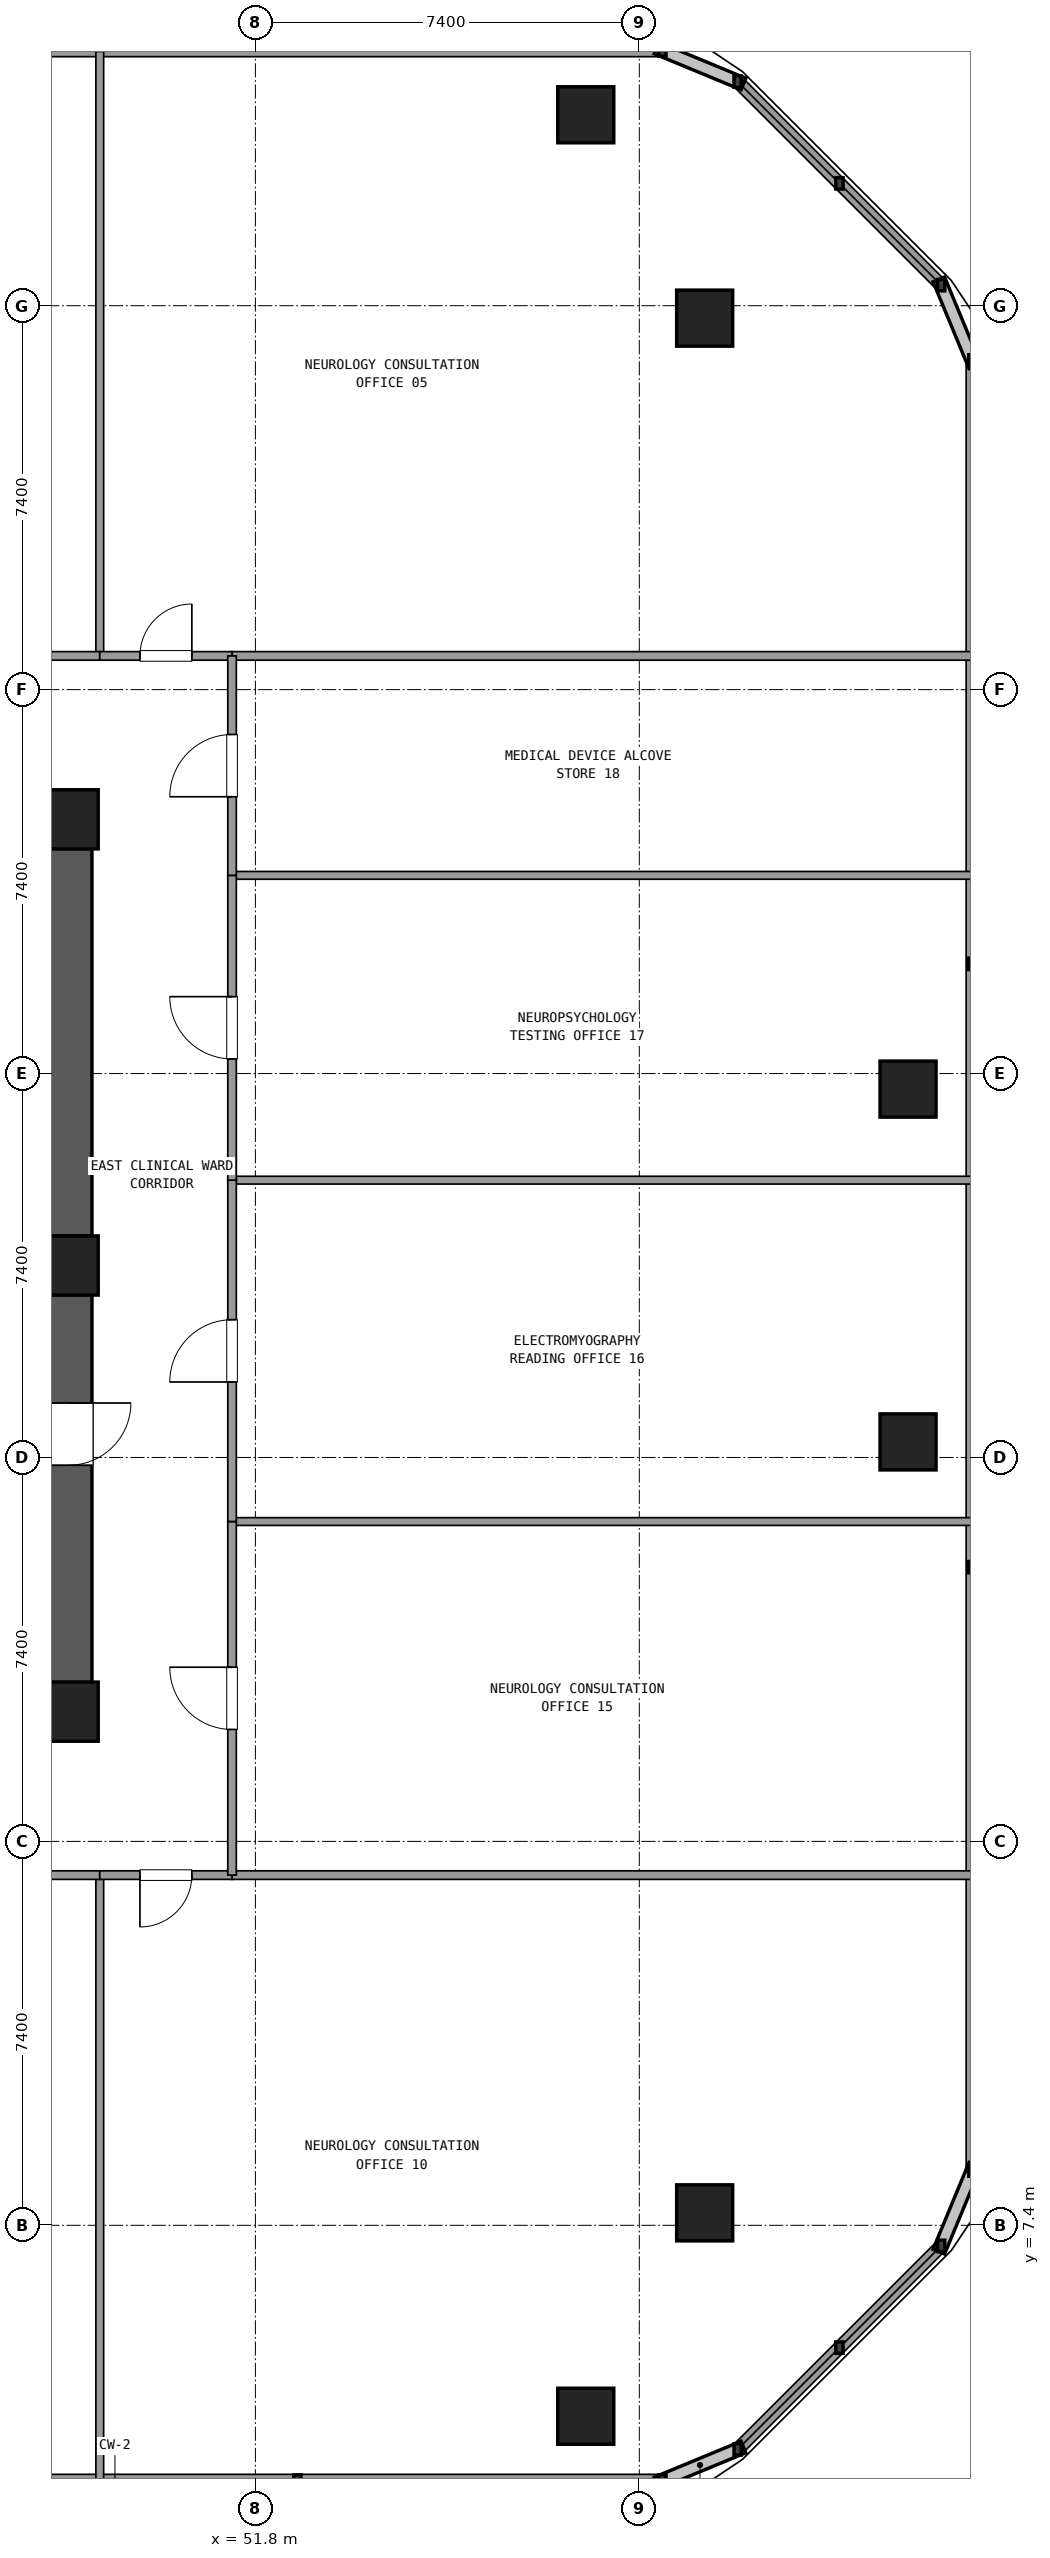
"""IFC4 building model, lengths in metres.
Left out: names, types, materials, properties, quantities, classifications, styles, units other than length and angle.
Written with IfcOpenShell. Run it as: python <this file> out.ifc"""

import sys

from ifc_helpers import new_model, si_unit, direction, frame, frame_2d, origin, origin_2d, place, context, subcontext, project, spatial, rectangle, extrude, element, fill, save


model = new_model("IFC4")
c1 = context("Model", 3, precision=1e-05, world=origin(), true_north=direction((0.0, 1.0)))
c2 = subcontext(c1, "Body", "Model", "MODEL_VIEW")
j1 = project(units=[si_unit("LENGTHUNIT", "METRE"), si_unit("PLANEANGLEUNIT", "RADIAN")], contexts=[c1])
p1 = place(None, origin())
s1 = spatial("IfcSite", under=j1, at=p1, CompositionType="ELEMENT")
p2 = place(p1, origin())
s2 = spatial("IfcBuilding", under=s1, at=p2, CompositionType="ELEMENT")
p3 = place(p2, frame((0.0, 0.0, 63.54)))
s3 = spatial("IfcBuildingStorey", under=s2, at=p3, CompositionType="ELEMENT", Elevation=63.54)
for number, where, z_axis, x_axis in (
    (1, (48.2, 17.3, 0.0), (0.0, 0.0, 1.0), (1.0, 0.0, 0.0)),
    (2, (48.2, 25.9, 0.0), (0.0, 0.0, 1.0), (1.0, 0.0, 0.0)),
    (3, (48.2, 34.5, 0.0), (0.0, 0.0, 1.0), (1.0, 0.0, 0.0)),
):
    element("IfcColumn", number, at=place(p3, frame(where, z_axis=z_axis, x_axis=x_axis)), inside=s3, PredefinedType="COLUMN", context=c2, shape_type="SweptSolid", body=[
        extrude(rectangle(XDim=1.14, YDim=1.14, at=origin_2d()), origin(), (0.0, 0.0, 1.0), 3.6),
    ])
p4 = place(p3, frame((48.2, 17.865, 0.0), z_axis=(0.0, 0.0, 1.0), x_axis=(0.0, 1.0, 0.0)))
e4 = element("IfcWall", 4, at=p4, inside=s3, PredefinedType="SHEAR", context=c2, shape_type="SweptSolid", body=[
    extrude(rectangle(XDim=7.47, YDim=0.9, at=frame_2d((3.735, 0.0))), origin(), (0.0, 0.0, 1.0), 3.32),
])
p5 = place(p4, frame((4.185, 0.0, 0.0)))
e5 = element("IfcOpeningElement", 5, at=p5, cuts=e4, PredefinedType="OPENING", context=c2, shape_type="SweptSolid", body=[
    extrude(rectangle(XDim=1.2, YDim=2.15, at=frame_2d((0.6, 1.075))), frame((0.0, 0.46, 0.0), z_axis=(0.0, -1.0, 0.0), x_axis=(1.0, 0.0, 0.0)), (0.0, 0.0, 1.0), 0.92),
])
p6 = place(p3, frame((48.2, 26.465, 0.0), z_axis=(0.0, 0.0, 1.0), x_axis=(0.0, 1.0, 0.0)))
e6 = element("IfcWall", 6, at=p6, inside=s3, PredefinedType="SHEAR", context=c2, shape_type="SweptSolid", body=[
    extrude(rectangle(XDim=7.47, YDim=0.9, at=frame_2d((3.735, 0.0))), origin(), (0.0, 0.0, 1.0), 3.32),
])
for number, where, z_axis, x_axis in (
    (7, (58.168, 3.72, 0.0), (0.0, 0.0, 1.0), (1.0, 0.0, 0.0)),
    (8, (60.46, 7.64, 0.0), (0.0, 0.0, 1.0), (1.0, 0.0, 0.0)),
    (9, (64.38, 22.5, 0.0), (0.0, 0.0, 1.0), (1.0, 0.0, 0.0)),
    (10, (64.38, 29.3, 0.0), (0.0, 0.0, 1.0), (1.0, 0.0, 0.0)),
    (11, (60.46, 44.16, 0.0), (0.0, 0.0, 1.0), (1.0, 0.0, 0.0)),
    (12, (58.168, 48.08, 0.0), (0.0, 0.0, 1.0), (1.0, 0.0, 0.0)),
):
    element("IfcColumn", number, at=place(p3, frame(where, z_axis=z_axis, x_axis=x_axis)), inside=s3, PredefinedType="COLUMN", context=c2, shape_type="SweptSolid", body=[
        extrude(rectangle(XDim=1.08, YDim=1.08, at=origin_2d()), origin(), (0.0, 0.0, 1.0), 3.6),
    ])
p7 = place(p3, frame((38.54, 2.48, 0.0), z_axis=(0.0, 0.0, 1.0), x_axis=(1.0, 0.0, 0.0)))
e13 = element("IfcWall", 13, at=p7, inside=s3, PredefinedType="SOLIDWALL", context=c2, shape_type="SweptSolid", body=[
    extrude(rectangle(XDim=21.105, YDim=0.24, at=frame_2d((10.552, 0.0))), origin(), (0.0, 0.0, 1.0), 0.85),
])
p8 = place(p3, frame((61.096, 3.081, 0.0), z_axis=(0.0, 0.0, 1.0), x_axis=(0.707128783731, 0.707084777957, 0.0)))
e14 = element("IfcWall", 14, at=p8, inside=s3, PredefinedType="SOLIDWALL", context=c2, shape_type="SweptSolid", body=[
    extrude(rectangle(XDim=5.548, YDim=0.24, at=frame_2d((2.774, 0.0))), origin(), (0.0, 0.0, 1.0), 0.85),
])
p9 = place(p3, frame((65.62, 8.455, 0.0), z_axis=(0.0, 0.0, 1.0), x_axis=(0.0, 1.0, 0.0)))
e15 = element("IfcWall", 15, at=p9, inside=s3, PredefinedType="SOLIDWALL", context=c2, shape_type="SweptSolid", body=[
    extrude(rectangle(XDim=34.89, YDim=0.24, at=frame_2d((17.445, 0.0))), origin(), (0.0, 0.0, 1.0), 0.85),
])
p10 = place(p3, frame((65.019, 44.796, 0.0), z_axis=(0.0, 0.0, 1.0), x_axis=(-0.707106781187, 0.707106781187, 0.0)))
e16 = element("IfcWall", 16, at=p10, inside=s3, PredefinedType="SOLIDWALL", context=c2, shape_type="SweptSolid", body=[
    extrude(rectangle(XDim=5.548, YDim=0.24, at=frame_2d((2.774, 0.0))), origin(), (0.0, 0.0, 1.0), 0.85),
])
p11 = place(p3, frame((59.645, 49.32, 0.0), z_axis=(0.0, 0.0, 1.0), x_axis=(-1.0, 0.0, 0.0)))
e17 = element("IfcWall", 17, at=p11, inside=s3, PredefinedType="SOLIDWALL", context=c2, shape_type="SweptSolid", body=[
    extrude(rectangle(XDim=45.29, YDim=0.24, at=frame_2d((22.645, 0.0))), origin(), (0.0, 0.0, 1.0), 0.85),
])
for number, where, z_axis, x_axis in (
    (18, (51.35, 37.65, 0.0), (0.0, 0.0, 1.0), (1.0, 0.0, 0.0)),
    (19, (51.35, 14.15, 0.0), (0.0, 0.0, 1.0), (1.0, 0.0, 0.0)),
):
    element("IfcWall", number, at=place(p3, frame(where, z_axis=z_axis, x_axis=x_axis)), inside=s3, PredefinedType="PARTITIONING", context=c2, shape_type="SweptSolid", body=[
        extrude(rectangle(XDim=14.25, YDim=0.165, at=frame_2d((7.125, 0.0))), origin(), (0.0, 0.0, 1.0), 2.61),
    ])
p12 = place(p3, frame((48.8, 37.65, 0.0), z_axis=(0.0, 0.0, 1.0), x_axis=(0.0, 1.0, 0.0)))
e20 = element("IfcWall", 20, at=p12, inside=s3, PredefinedType="PARTITIONING", context=c2, shape_type="SweptSolid", body=[
    extrude(rectangle(XDim=11.65, YDim=0.15, at=frame_2d((5.825, 0.0))), origin(), (0.0, 0.0, 1.0), 2.61),
])
p13 = place(p3, frame((41.413, 37.65, 0.0), z_axis=(0.0, 0.0, 1.0), x_axis=(1.0, 0.0, 0.0)))
e21 = element("IfcWall", 21, at=p13, inside=s3, PredefinedType="PARTITIONING", context=c2, shape_type="SweptSolid", body=[
    extrude(rectangle(XDim=7.387, YDim=0.165, at=frame_2d((3.693, 0.0))), origin(), (0.0, 0.0, 1.0), 2.61),
])
p14 = place(p13, frame((3.094, 0.0, 0.0)))
e22 = element("IfcOpeningElement", 22, at=p14, cuts=e21, PredefinedType="OPENING", context=c2, shape_type="SweptSolid", body=[
    extrude(rectangle(XDim=1.2, YDim=2.15, at=frame_2d((0.6, 1.075))), frame((0.0, 0.093, 0.0), z_axis=(0.0, -1.0, 0.0), x_axis=(1.0, 0.0, 0.0)), (0.0, 0.0, 1.0), 0.185),
])
p15 = place(p3, frame((48.8, 37.65, 0.0), z_axis=(0.0, 0.0, 1.0), x_axis=(1.0, 0.0, 0.0)))
e23 = element("IfcWall", 23, at=p15, inside=s3, PredefinedType="PARTITIONING", context=c2, shape_type="SweptSolid", body=[
    extrude(rectangle(XDim=2.55, YDim=0.165, at=frame_2d((1.275, 0.0))), origin(), (0.0, 0.0, 1.0), 2.61),
])
p16 = place(p15, frame((0.775, 0.0, 0.0)))
e24 = element("IfcOpeningElement", 24, at=p16, cuts=e23, PredefinedType="OPENING", context=c2, shape_type="SweptSolid", body=[
    extrude(rectangle(XDim=1.0, YDim=2.15, at=frame_2d((0.5, 1.075))), frame((0.0, 0.093, 0.0), z_axis=(0.0, -1.0, 0.0), x_axis=(1.0, 0.0, 0.0)), (0.0, 0.0, 1.0), 0.185),
])
p17 = place(p3, frame((48.8, 14.15, 0.0), z_axis=(0.0, 0.0, 1.0), x_axis=(0.0, -1.0, 0.0)))
e25 = element("IfcWall", 25, at=p17, inside=s3, PredefinedType="PARTITIONING", context=c2, shape_type="SweptSolid", body=[
    extrude(rectangle(XDim=11.65, YDim=0.15, at=frame_2d((5.825, 0.0))), origin(), (0.0, 0.0, 1.0), 2.61),
])
p18 = place(p3, frame((41.527, 14.15, 0.0), z_axis=(0.0, 0.0, 1.0), x_axis=(1.0, 0.0, 0.0)))
e26 = element("IfcWall", 26, at=p18, inside=s3, PredefinedType="PARTITIONING", context=c2, shape_type="SweptSolid", body=[
    extrude(rectangle(XDim=7.273, YDim=0.165, at=frame_2d((3.636, 0.0))), origin(), (0.0, 0.0, 1.0), 2.61),
])
p19 = place(p18, frame((3.036, 0.0, 0.0)))
e27 = element("IfcOpeningElement", 27, at=p19, cuts=e26, PredefinedType="OPENING", context=c2, shape_type="SweptSolid", body=[
    extrude(rectangle(XDim=1.2, YDim=2.15, at=frame_2d((0.6, 1.075))), frame((0.0, 0.093, 0.0), z_axis=(0.0, -1.0, 0.0), x_axis=(1.0, 0.0, 0.0)), (0.0, 0.0, 1.0), 0.185),
])
p20 = place(p3, frame((48.8, 14.15, 0.0), z_axis=(0.0, 0.0, 1.0), x_axis=(1.0, 0.0, 0.0)))
e28 = element("IfcWall", 28, at=p20, inside=s3, PredefinedType="PARTITIONING", context=c2, shape_type="SweptSolid", body=[
    extrude(rectangle(XDim=2.55, YDim=0.165, at=frame_2d((1.275, 0.0))), origin(), (0.0, 0.0, 1.0), 2.61),
])
p21 = place(p20, frame((0.775, 0.0, 0.0)))
e29 = element("IfcOpeningElement", 29, at=p21, cuts=e28, PredefinedType="OPENING", context=c2, shape_type="SweptSolid", body=[
    extrude(rectangle(XDim=1.0, YDim=2.15, at=frame_2d((0.5, 1.075))), frame((0.0, 0.093, 0.0), z_axis=(0.0, -1.0, 0.0), x_axis=(1.0, 0.0, 0.0)), (0.0, 0.0, 1.0), 0.185),
])
p22 = place(p3, frame((51.35, 20.965, 0.0), z_axis=(0.0, 0.0, 1.0), x_axis=(1.0, 0.0, 0.0)))
e30 = element("IfcWall", 30, at=p22, inside=s3, PredefinedType="PARTITIONING", context=c2, shape_type="SweptSolid", body=[
    extrude(rectangle(XDim=14.25, YDim=0.15, at=frame_2d((7.125, 0.0))), origin(), (0.0, 0.0, 1.0), 2.61),
])
p23 = place(p3, frame((51.35, 14.15, 0.0), z_axis=(0.0, 0.0, 1.0), x_axis=(0.0, 1.0, 0.0)))
e31 = element("IfcWall", 31, at=p23, inside=s3, PredefinedType="PARTITIONING", context=c2, shape_type="SweptSolid", body=[
    extrude(rectangle(XDim=6.815, YDim=0.165, at=frame_2d((3.408, 0.0))), origin(), (0.0, 0.0, 1.0), 2.61),
])
p24 = place(p23, frame((2.807, 0.0, 0.0)))
e32 = element("IfcOpeningElement", 32, at=p24, cuts=e31, PredefinedType="OPENING", context=c2, shape_type="SweptSolid", body=[
    extrude(rectangle(XDim=1.2, YDim=2.15, at=frame_2d((0.6, 1.075))), frame((0.0, 0.093, 0.0), z_axis=(0.0, -1.0, 0.0), x_axis=(1.0, 0.0, 0.0)), (0.0, 0.0, 1.0), 0.185),
])
p25 = place(p3, frame((51.35, 27.545, 0.0), z_axis=(0.0, 0.0, 1.0), x_axis=(1.0, 0.0, 0.0)))
e33 = element("IfcWall", 33, at=p25, inside=s3, PredefinedType="PARTITIONING", context=c2, shape_type="SweptSolid", body=[
    extrude(rectangle(XDim=14.25, YDim=0.15, at=frame_2d((7.125, 0.0))), origin(), (0.0, 0.0, 1.0), 2.61),
])
p26 = place(p3, frame((51.35, 20.965, 0.0), z_axis=(0.0, 0.0, 1.0), x_axis=(0.0, 1.0, 0.0)))
e34 = element("IfcWall", 34, at=p26, inside=s3, PredefinedType="PARTITIONING", context=c2, shape_type="SweptSolid", body=[
    extrude(rectangle(XDim=6.58, YDim=0.165, at=frame_2d((3.29, 0.0))), origin(), (0.0, 0.0, 1.0), 2.61),
])
p27 = place(p26, frame((2.69, 0.0, 0.0)))
e35 = element("IfcOpeningElement", 35, at=p27, cuts=e34, PredefinedType="OPENING", context=c2, shape_type="SweptSolid", body=[
    extrude(rectangle(XDim=1.2, YDim=2.15, at=frame_2d((0.6, 1.075))), frame((0.0, 0.093, 0.0), z_axis=(0.0, -1.0, 0.0), x_axis=(1.0, 0.0, 0.0)), (0.0, 0.0, 1.0), 0.185),
])
p28 = place(p3, frame((51.35, 33.42, 0.0), z_axis=(0.0, 0.0, 1.0), x_axis=(1.0, 0.0, 0.0)))
e36 = element("IfcWall", 36, at=p28, inside=s3, PredefinedType="PARTITIONING", context=c2, shape_type="SweptSolid", body=[
    extrude(rectangle(XDim=14.25, YDim=0.15, at=frame_2d((7.125, 0.0))), origin(), (0.0, 0.0, 1.0), 2.61),
])
p29 = place(p3, frame((51.35, 27.545, 0.0), z_axis=(0.0, 0.0, 1.0), x_axis=(0.0, 1.0, 0.0)))
e37 = element("IfcWall", 37, at=p29, inside=s3, PredefinedType="PARTITIONING", context=c2, shape_type="SweptSolid", body=[
    extrude(rectangle(XDim=5.875, YDim=0.165, at=frame_2d((2.938, 0.0))), origin(), (0.0, 0.0, 1.0), 2.61),
])
p30 = place(p29, frame((2.337, 0.0, 0.0)))
e38 = element("IfcOpeningElement", 38, at=p30, cuts=e37, PredefinedType="OPENING", context=c2, shape_type="SweptSolid", body=[
    extrude(rectangle(XDim=1.2, YDim=2.15, at=frame_2d((0.6, 1.075))), frame((0.0, 0.093, 0.0), z_axis=(0.0, -1.0, 0.0), x_axis=(1.0, 0.0, 0.0)), (0.0, 0.0, 1.0), 0.185),
])
p31 = place(p3, frame((51.35, 33.42, 0.0), z_axis=(0.0, 0.0, 1.0), x_axis=(0.0, 1.0, 0.0)))
e39 = element("IfcWall", 39, at=p31, inside=s3, PredefinedType="PARTITIONING", context=c2, shape_type="SweptSolid", body=[
    extrude(rectangle(XDim=4.23, YDim=0.165, at=frame_2d((2.115, 0.0))), origin(), (0.0, 0.0, 1.0), 2.61),
])
p32 = place(p31, frame((1.515, 0.0, 0.0)))
e40 = element("IfcOpeningElement", 40, at=p32, cuts=e39, PredefinedType="OPENING", context=c2, shape_type="SweptSolid", body=[
    extrude(rectangle(XDim=1.2, YDim=2.15, at=frame_2d((0.6, 1.075))), frame((0.0, 0.093, 0.0), z_axis=(0.0, -1.0, 0.0), x_axis=(1.0, 0.0, 0.0)), (0.0, 0.0, 1.0), 0.185),
])
p33 = place(p5, frame((1.2, 0.0, 0.0), z_axis=(0.0, 0.0, 1.0), x_axis=(-1.0, 0.0, 0.0)))
e41 = element("IfcDoor", 41, at=p33, inside=s3, OperationType="SINGLE_SWING_RIGHT", PredefinedType="DOOR", context=c2, shape_type="SweptSolid", body=[
    extrude(rectangle(XDim=1.2, YDim=2.15, at=frame_2d((0.6, 1.075))), frame((0.0, 0.025, 0.0), z_axis=(0.0, -1.0, 0.0), x_axis=(1.0, 0.0, 0.0)), (0.0, 0.0, 1.0), 0.05),
])
fill(e5, e41)
p34 = place(p16, origin())
e42 = element("IfcDoor", 42, at=p34, inside=s3, OperationType="SINGLE_SWING_RIGHT", PredefinedType="DOOR", context=c2, shape_type="SweptSolid", body=[
    extrude(rectangle(XDim=1.0, YDim=2.15, at=frame_2d((0.5, 1.075))), frame((0.0, 0.025, 0.0), z_axis=(0.0, -1.0, 0.0), x_axis=(1.0, 0.0, 0.0)), (0.0, 0.0, 1.0), 0.05),
])
fill(e24, e42)
p35 = place(p21, frame((1.0, 0.0, 0.0), z_axis=(0.0, 0.0, 1.0), x_axis=(-1.0, 0.0, 0.0)))
e43 = element("IfcDoor", 43, at=p35, inside=s3, OperationType="SINGLE_SWING_LEFT", PredefinedType="DOOR", context=c2, shape_type="SweptSolid", body=[
    extrude(rectangle(XDim=1.0, YDim=2.15, at=frame_2d((0.5, 1.075))), frame((0.0, 0.025, 0.0), z_axis=(0.0, -1.0, 0.0), x_axis=(1.0, 0.0, 0.0)), (0.0, 0.0, 1.0), 0.05),
])
fill(e29, e43)
p36 = place(p24, origin())
e44 = element("IfcDoor", 44, at=p36, inside=s3, OperationType="SINGLE_SWING_RIGHT", PredefinedType="DOOR", context=c2, shape_type="SweptSolid", body=[
    extrude(rectangle(XDim=1.2, YDim=2.15, at=frame_2d((0.6, 1.075))), frame((0.0, 0.025, 0.0), z_axis=(0.0, -1.0, 0.0), x_axis=(1.0, 0.0, 0.0)), (0.0, 0.0, 1.0), 0.05),
])
fill(e32, e44)
p37 = place(p27, origin())
e45 = element("IfcDoor", 45, at=p37, inside=s3, OperationType="SINGLE_SWING_LEFT", PredefinedType="DOOR", context=c2, shape_type="SweptSolid", body=[
    extrude(rectangle(XDim=1.2, YDim=2.15, at=frame_2d((0.6, 1.075))), frame((0.0, 0.025, 0.0), z_axis=(0.0, -1.0, 0.0), x_axis=(1.0, 0.0, 0.0)), (0.0, 0.0, 1.0), 0.05),
])
fill(e35, e45)
p38 = place(p30, origin())
e46 = element("IfcDoor", 46, at=p38, inside=s3, OperationType="SINGLE_SWING_RIGHT", PredefinedType="DOOR", context=c2, shape_type="SweptSolid", body=[
    extrude(rectangle(XDim=1.2, YDim=2.15, at=frame_2d((0.6, 1.075))), frame((0.0, 0.025, 0.0), z_axis=(0.0, -1.0, 0.0), x_axis=(1.0, 0.0, 0.0)), (0.0, 0.0, 1.0), 0.05),
])
fill(e38, e46)
p39 = place(p32, origin())
e47 = element("IfcDoor", 47, at=p39, inside=s3, OperationType="SINGLE_SWING_LEFT", PredefinedType="DOOR", context=c2, shape_type="SweptSolid", body=[
    extrude(rectangle(XDim=1.2, YDim=2.15, at=frame_2d((0.6, 1.075))), frame((0.0, 0.025, 0.0), z_axis=(0.0, -1.0, 0.0), x_axis=(1.0, 0.0, 0.0)), (0.0, 0.0, 1.0), 0.05),
])
fill(e40, e47)
save(model, sys.argv[1])
